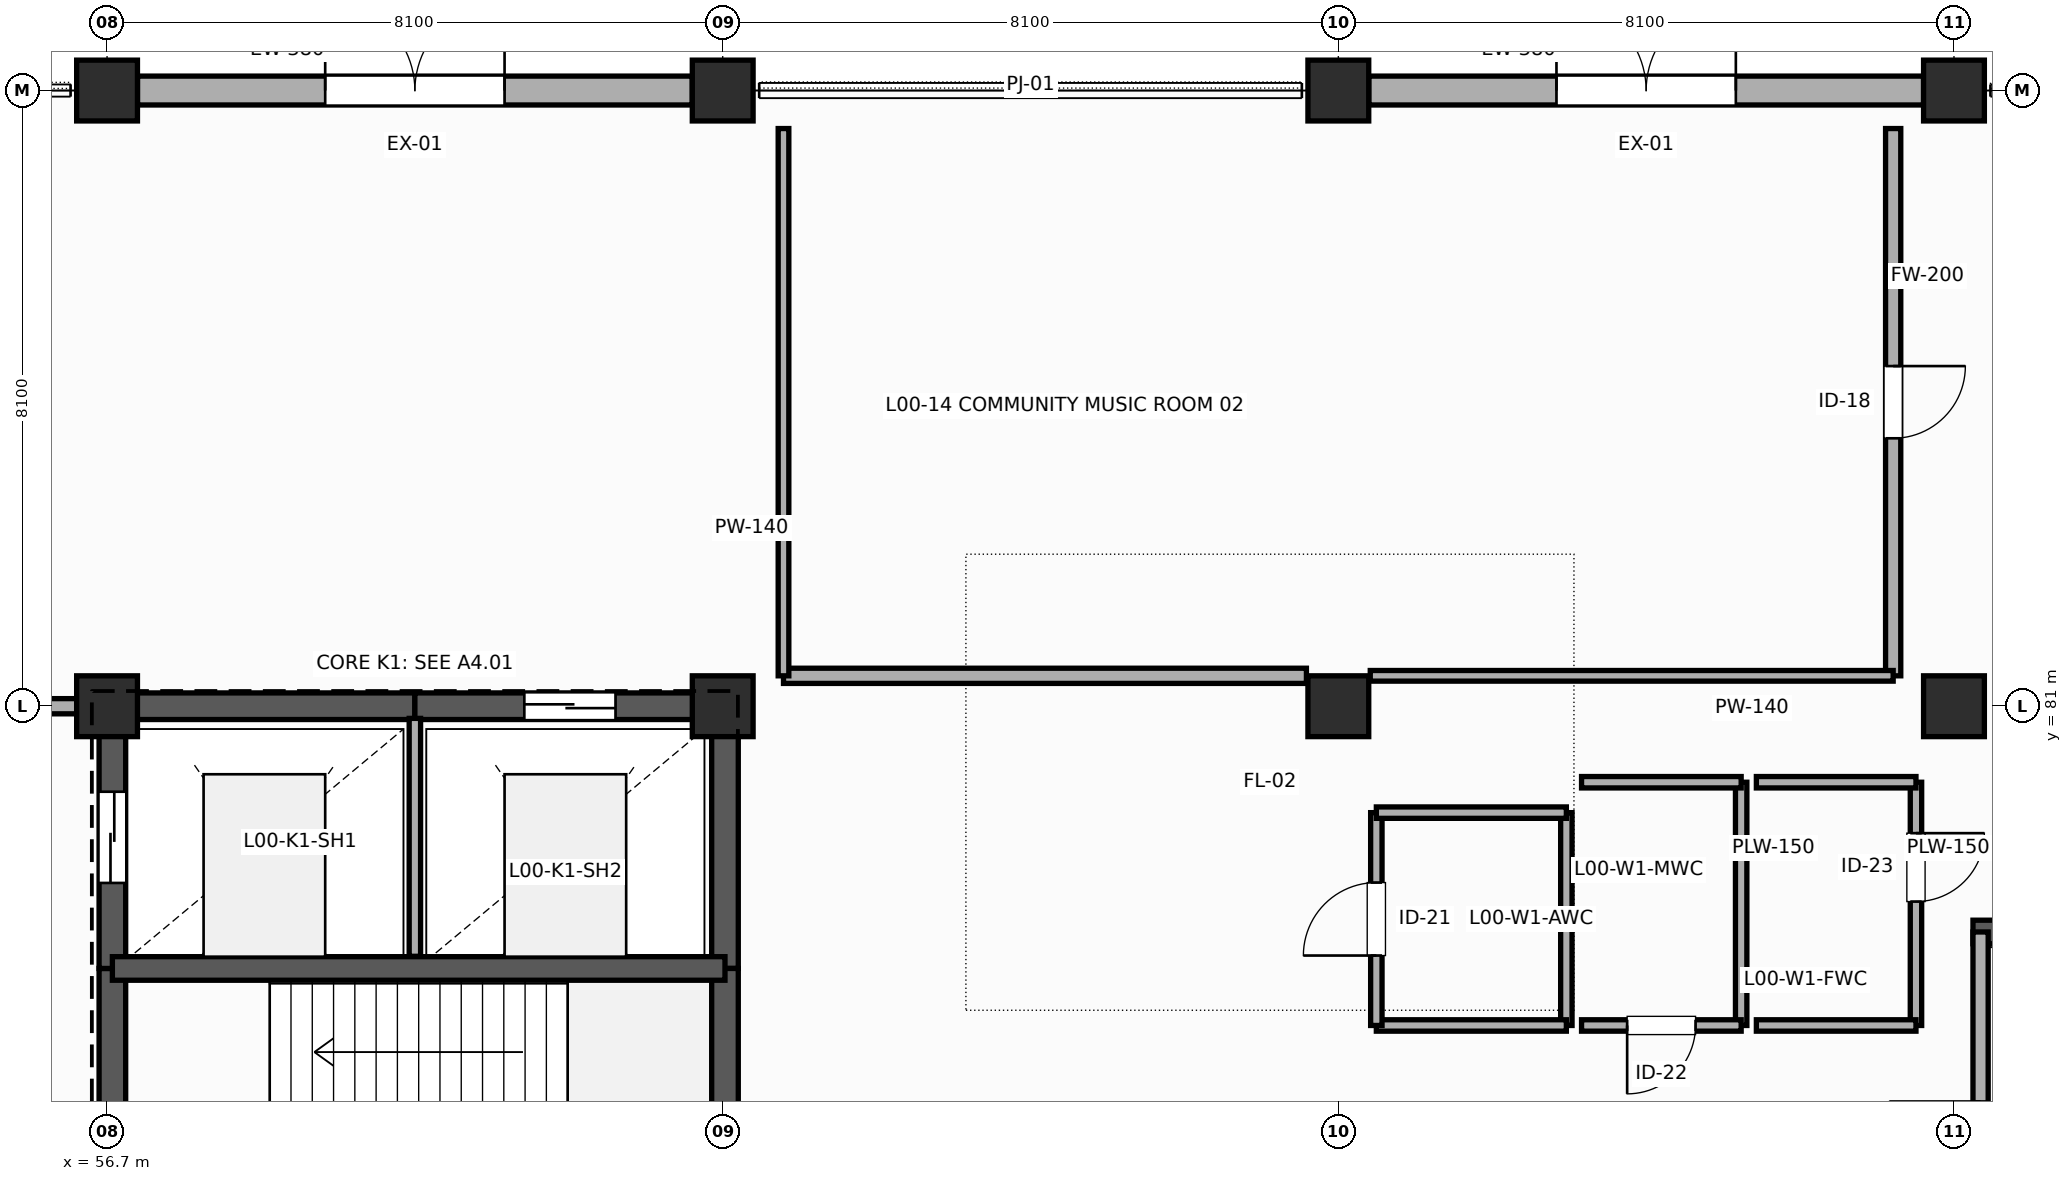
"""IFC4 building model, lengths in metres.
Left out: names, types, materials, properties, quantities, classifications, styles, units other than length and angle.
Written with IfcOpenShell. Run it as: python <this file> out.ifc"""

import sys

from ifc_helpers import new_model, si_unit, direction, frame, frame_2d, origin, origin_2d, place, context, subcontext, project, spatial, rectangle, extrude, element, fill, save


model = new_model("IFC4")
c1 = context("Model", 3, precision=1e-05, world=origin(), true_north=direction((0.0, 1.0)))
c2 = subcontext(c1, "Body", "Model", "MODEL_VIEW")
j1 = project(units=[si_unit("LENGTHUNIT", "METRE"), si_unit("PLANEANGLEUNIT", "RADIAN")], contexts=[c1])
p1 = place(None, origin())
s1 = spatial("IfcSite", under=j1, at=p1, CompositionType="ELEMENT")
p2 = place(p1, origin())
s2 = spatial("IfcBuilding", under=s1, at=p2, CompositionType="ELEMENT")
p3 = place(p2, origin())
s3 = spatial("IfcBuildingStorey", under=s2, at=p3, CompositionType="ELEMENT", Elevation=0.0)
for number, where, z_axis, x_axis in (
    (1, (56.7, 81.0, 0.0), (0.0, 0.0, 1.0), (1.0, 0.0, 0.0)),
    (2, (56.7, 89.1, 0.0), (0.0, 0.0, 1.0), (1.0, 0.0, 0.0)),
    (3, (64.8, 81.0, 0.0), (0.0, 0.0, 1.0), (1.0, 0.0, 0.0)),
    (4, (64.8, 89.1, 0.0), (0.0, 0.0, 1.0), (1.0, 0.0, 0.0)),
    (5, (72.9, 81.0, 0.0), (0.0, 0.0, 1.0), (1.0, 0.0, 0.0)),
    (6, (72.9, 89.1, 0.0), (0.0, 0.0, 1.0), (1.0, 0.0, 0.0)),
    (7, (81.0, 81.0, 0.0), (0.0, 0.0, 1.0), (1.0, 0.0, 0.0)),
    (8, (81.0, 89.1, 0.0), (0.0, 0.0, 1.0), (1.0, 0.0, 0.0)),
):
    element("IfcColumn", number, at=place(p3, frame(where, z_axis=z_axis, x_axis=x_axis)), inside=s3, PredefinedType="COLUMN", context=c2, shape_type="SweptSolid", body=[
        extrude(rectangle(XDim=0.8, YDim=0.8, at=origin_2d()), origin(), (0.0, 0.0, 1.0), 5.4),
    ])
p4 = place(p3, frame((57.1, 89.1, 0.0), z_axis=(0.0, 0.0, 1.0), x_axis=(1.0, 0.0, 0.0)))
e9 = element("IfcWall", 9, at=p4, inside=s3, PredefinedType="SOLIDWALL", context=c2, shape_type="SweptSolid", body=[
    extrude(rectangle(XDim=7.3, YDim=0.38, at=frame_2d((3.65, 0.0))), origin(), (0.0, 0.0, 1.0), 4.675),
])
p5 = place(p4, frame((2.47, 0.0, 0.0)))
e10 = element("IfcOpeningElement", 10, at=p5, cuts=e9, PredefinedType="OPENING", context=c2, shape_type="SweptSolid", body=[
    extrude(rectangle(XDim=2.36, YDim=2.4, at=frame_2d((1.18, 1.2))), frame((0.0, 0.2, 0.0), z_axis=(0.0, -1.0, 0.0), x_axis=(1.0, 0.0, 0.0)), (0.0, 0.0, 1.0), 0.4),
])
p6 = place(p3, frame((73.3, 89.1, 0.0), z_axis=(0.0, 0.0, 1.0), x_axis=(1.0, 0.0, 0.0)))
e11 = element("IfcWall", 11, at=p6, inside=s3, PredefinedType="SOLIDWALL", context=c2, shape_type="SweptSolid", body=[
    extrude(rectangle(XDim=7.3, YDim=0.38, at=frame_2d((3.65, 0.0))), origin(), (0.0, 0.0, 1.0), 4.675),
])
p7 = place(p6, frame((2.47, 0.0, 0.0)))
e12 = element("IfcOpeningElement", 12, at=p7, cuts=e11, PredefinedType="OPENING", context=c2, shape_type="SweptSolid", body=[
    extrude(rectangle(XDim=2.36, YDim=2.4, at=frame_2d((1.18, 1.2))), frame((0.0, 0.2, 0.0), z_axis=(0.0, -1.0, 0.0), x_axis=(1.0, 0.0, 0.0)), (0.0, 0.0, 1.0), 0.4),
])
p8 = place(p3, frame((56.77, 73.13, 0.0), z_axis=(0.0, 0.0, 1.0), x_axis=(0.0, 1.0, 0.0)))
e13 = element("IfcWall", 13, at=p8, inside=s3, PredefinedType="SHEAR", context=c2, shape_type="SweptSolid", body=[
    extrude(rectangle(XDim=4.42, YDim=0.35, at=frame_2d((2.21, 0.0))), origin(), (0.0, 0.0, 1.0), 5.4),
])
p9 = place(p8, frame((1.35, 0.0, 0.0)))
e14 = element("IfcOpeningElement", 14, at=p9, cuts=e13, PredefinedType="OPENING", context=c2, shape_type="SweptSolid", body=[
    extrude(rectangle(XDim=1.2, YDim=2.25, at=frame_2d((0.6, 1.125))), frame((0.0, 0.185, 0.0), z_axis=(0.0, -1.0, 0.0), x_axis=(1.0, 0.0, 0.0)), (0.0, 0.0, 1.0), 0.37),
])
p10 = place(p3, frame((56.77, 77.55, 0.0), z_axis=(0.0, 0.0, 1.0), x_axis=(0.0, 1.0, 0.0)))
e15 = element("IfcWall", 15, at=p10, inside=s3, PredefinedType="SHEAR", context=c2, shape_type="SweptSolid", body=[
    extrude(rectangle(XDim=3.45, YDim=0.35, at=frame_2d((1.725, 0.0))), origin(), (0.0, 0.0, 1.0), 5.4),
])
p11 = place(p10, frame((1.125, 0.0, 0.0)))
e16 = element("IfcOpeningElement", 16, at=p11, cuts=e15, PredefinedType="OPENING", context=c2, shape_type="SweptSolid", body=[
    extrude(rectangle(XDim=1.2, YDim=2.2, at=frame_2d((0.6, 1.1))), frame((0.0, 0.185, 0.0), z_axis=(0.0, -1.0, 0.0), x_axis=(1.0, 0.0, 0.0)), (0.0, 0.0, 1.0), 0.37),
])
p12 = place(p3, frame((56.77, 81.0, 0.0), z_axis=(0.0, 0.0, 1.0), x_axis=(1.0, 0.0, 0.0)))
e17 = element("IfcWall", 17, at=p12, inside=s3, PredefinedType="SHEAR", context=c2, shape_type="SweptSolid", body=[
    extrude(rectangle(XDim=3.98, YDim=0.35, at=frame_2d((1.99, 0.0))), origin(), (0.0, 0.0, 1.0), 5.4),
])
p13 = place(p3, frame((60.75, 81.0, 0.0), z_axis=(0.0, 0.0, 1.0), x_axis=(1.0, 0.0, 0.0)))
e18 = element("IfcWall", 18, at=p13, inside=s3, PredefinedType="SHEAR", context=c2, shape_type="SweptSolid", body=[
    extrude(rectangle(XDim=4.08, YDim=0.35, at=frame_2d((2.04, 0.0))), origin(), (0.0, 0.0, 1.0), 5.4),
])
p14 = place(p13, frame((1.44, 0.0, 0.0)))
e19 = element("IfcOpeningElement", 19, at=p14, cuts=e18, PredefinedType="OPENING", context=c2, shape_type="SweptSolid", body=[
    extrude(rectangle(XDim=1.2, YDim=2.2, at=frame_2d((0.6, 1.1))), frame((0.0, 0.185, 0.0), z_axis=(0.0, -1.0, 0.0), x_axis=(1.0, 0.0, 0.0)), (0.0, 0.0, 1.0), 0.37),
])
p15 = place(p3, frame((64.83, 81.0, 0.0), z_axis=(0.0, 0.0, 1.0), x_axis=(0.0, -1.0, 0.0)))
e20 = element("IfcWall", 20, at=p15, inside=s3, PredefinedType="SHEAR", context=c2, shape_type="SweptSolid", body=[
    extrude(rectangle(XDim=3.45, YDim=0.35, at=frame_2d((1.725, 0.0))), origin(), (0.0, 0.0, 1.0), 5.4),
])
p16 = place(p3, frame((64.83, 77.55, 0.0), z_axis=(0.0, 0.0, 1.0), x_axis=(0.0, -1.0, 0.0)))
e21 = element("IfcWall", 21, at=p16, inside=s3, PredefinedType="SHEAR", context=c2, shape_type="SweptSolid", body=[
    extrude(rectangle(XDim=4.42, YDim=0.35, at=frame_2d((2.21, 0.0))), origin(), (0.0, 0.0, 1.0), 5.4),
])
p17 = place(p3, frame((56.77, 77.55, 0.0), z_axis=(0.0, 0.0, 1.0), x_axis=(1.0, 0.0, 0.0)))
e22 = element("IfcWall", 22, at=p17, inside=s3, PredefinedType="SHEAR", context=c2, shape_type="SweptSolid", body=[
    extrude(rectangle(XDim=8.06, YDim=0.31, at=frame_2d((4.03, 0.0))), origin(), (0.0, 0.0, 1.0), 5.4),
])
p18 = place(p3, frame((60.75, 77.71, 0.0), z_axis=(0.0, 0.0, 1.0), x_axis=(0.0, 1.0, 0.0)))
e23 = element("IfcWall", 23, at=p18, inside=s3, PredefinedType="PLUMBINGWALL", context=c2, shape_type="SweptSolid", body=[
    extrude(rectangle(XDim=3.13, YDim=0.15, at=frame_2d((1.565, 0.0))), origin(), (0.0, 0.0, 1.0), 5.05),
])
p19 = place(p3, frame((51.3, 81.0, 0.0), z_axis=(0.0, 0.0, 1.0), x_axis=(1.0, 0.0, 0.0)))
e24 = element("IfcWall", 24, at=p19, inside=s3, PredefinedType="PARTITIONING", context=c2, shape_type="SweptSolid", body=[
    extrude(rectangle(XDim=5.0, YDim=0.2, at=frame_2d((2.5, 0.0))), origin(), (0.0, 0.0, 1.0), 4.611),
])
p20 = place(p3, frame((89.795, 78.03, 0.0), z_axis=(0.0, 0.0, 1.0), x_axis=(-1.0, 0.0, 0.0)))
e25 = element("IfcWall", 25, at=p20, inside=s3, PredefinedType="SHEAR", context=c2, shape_type="SweptSolid", body=[
    extrude(rectangle(XDim=8.545, YDim=0.31, at=frame_2d((4.272, 0.0))), origin(), (0.0, 0.0, 1.0), 5.4),
])
p21 = place(p3, frame((81.35, 73.35, 0.0), z_axis=(0.0, 0.0, 1.0), x_axis=(0.0, 1.0, 0.0)))
e26 = element("IfcWall", 26, at=p21, inside=s3, PredefinedType="PARTITIONING", context=c2, shape_type="SweptSolid", body=[
    extrude(rectangle(XDim=4.68, YDim=0.2, at=frame_2d((2.34, 0.0))), origin(), (0.0, 0.0, 1.0), 5.05),
])
p22 = place(p21, frame((1.25, 0.0, 0.0)))
e27 = element("IfcOpeningElement", 27, at=p22, cuts=e26, PredefinedType="OPENING", context=c2, shape_type="SweptSolid", body=[
    extrude(rectangle(XDim=1.2, YDim=2.25, at=frame_2d((0.6, 1.125))), frame((0.0, 0.11, 0.0), z_axis=(0.0, -1.0, 0.0), x_axis=(1.0, 0.0, 0.0)), (0.0, 0.0, 1.0), 0.22),
])
p23 = place(p3, frame((75.9, 79.6, 0.0), z_axis=(0.0, 0.0, 1.0), x_axis=(0.0, -1.0, 0.0)))
e28 = element("IfcWall", 28, at=p23, inside=s3, PredefinedType="PLUMBINGWALL", context=c2, shape_type="SweptSolid", body=[
    extrude(rectangle(XDim=2.8, YDim=0.15, at=frame_2d((1.4, 0.0))), origin(), (0.0, 0.0, 1.0), 5.12),
])
p24 = place(p3, frame((75.9, 76.8, 0.0), z_axis=(0.0, 0.0, 1.0), x_axis=(-1.0, 0.0, 0.0)))
e29 = element("IfcWall", 29, at=p24, inside=s3, PredefinedType="PLUMBINGWALL", context=c2, shape_type="SweptSolid", body=[
    extrude(rectangle(XDim=2.5, YDim=0.15, at=frame_2d((1.25, 0.0))), origin(), (0.0, 0.0, 1.0), 5.12),
])
p25 = place(p3, frame((73.4, 76.8, 0.0), z_axis=(0.0, 0.0, 1.0), x_axis=(0.0, 1.0, 0.0)))
e30 = element("IfcWall", 30, at=p25, inside=s3, PredefinedType="PLUMBINGWALL", context=c2, shape_type="SweptSolid", body=[
    extrude(rectangle(XDim=2.8, YDim=0.15, at=frame_2d((1.4, 0.0))), origin(), (0.0, 0.0, 1.0), 5.12),
])
p26 = place(p25, frame((0.92, 0.0, 0.0)))
e31 = element("IfcOpeningElement", 31, at=p26, cuts=e30, PredefinedType="OPENING", context=c2, shape_type="SweptSolid", body=[
    extrude(rectangle(XDim=0.96, YDim=2.16, at=frame_2d((0.48, 1.08))), frame((0.0, 0.085, 0.0), z_axis=(0.0, -1.0, 0.0), x_axis=(1.0, 0.0, 0.0)), (0.0, 0.0, 1.0), 0.17),
])
p27 = place(p3, frame((73.4, 79.6, 0.0), z_axis=(0.0, 0.0, 1.0), x_axis=(1.0, 0.0, 0.0)))
e32 = element("IfcWall", 32, at=p27, inside=s3, PredefinedType="PLUMBINGWALL", context=c2, shape_type="SweptSolid", body=[
    extrude(rectangle(XDim=2.5, YDim=0.15, at=frame_2d((1.25, 0.0))), origin(), (0.0, 0.0, 1.0), 5.12),
])
p28 = place(p3, frame((78.2, 80.0, 0.0), z_axis=(0.0, 0.0, 1.0), x_axis=(0.0, -1.0, 0.0)))
e33 = element("IfcWall", 33, at=p28, inside=s3, PredefinedType="PLUMBINGWALL", context=c2, shape_type="SweptSolid", body=[
    extrude(rectangle(XDim=3.2, YDim=0.15, at=frame_2d((1.6, 0.0))), origin(), (0.0, 0.0, 1.0), 5.12),
])
p29 = place(p3, frame((78.2, 76.8, 0.0), z_axis=(0.0, 0.0, 1.0), x_axis=(-1.0, 0.0, 0.0)))
e34 = element("IfcWall", 34, at=p29, inside=s3, PredefinedType="PLUMBINGWALL", context=c2, shape_type="SweptSolid", body=[
    extrude(rectangle(XDim=2.1, YDim=0.15, at=frame_2d((1.05, 0.0))), origin(), (0.0, 0.0, 1.0), 5.12),
])
p30 = place(p29, frame((0.6, 0.0, 0.0)))
e35 = element("IfcOpeningElement", 35, at=p30, cuts=e34, PredefinedType="OPENING", context=c2, shape_type="SweptSolid", body=[
    extrude(rectangle(XDim=0.9, YDim=2.1, at=frame_2d((0.45, 1.05))), frame((0.0, 0.085, 0.0), z_axis=(0.0, -1.0, 0.0), x_axis=(1.0, 0.0, 0.0)), (0.0, 0.0, 1.0), 0.17),
])
p31 = place(p3, frame((76.1, 80.0, 0.0), z_axis=(0.0, 0.0, 1.0), x_axis=(1.0, 0.0, 0.0)))
e36 = element("IfcWall", 36, at=p31, inside=s3, PredefinedType="PLUMBINGWALL", context=c2, shape_type="SweptSolid", body=[
    extrude(rectangle(XDim=2.1, YDim=0.15, at=frame_2d((1.05, 0.0))), origin(), (0.0, 0.0, 1.0), 5.12),
])
p32 = place(p3, frame((80.5, 80.0, 0.0), z_axis=(0.0, 0.0, 1.0), x_axis=(0.0, -1.0, 0.0)))
e37 = element("IfcWall", 37, at=p32, inside=s3, PredefinedType="PLUMBINGWALL", context=c2, shape_type="SweptSolid", body=[
    extrude(rectangle(XDim=3.2, YDim=0.15, at=frame_2d((1.6, 0.0))), origin(), (0.0, 0.0, 1.0), 5.12),
])
p33 = place(p32, frame((0.67, 0.0, 0.0)))
e38 = element("IfcOpeningElement", 38, at=p33, cuts=e37, PredefinedType="OPENING", context=c2, shape_type="SweptSolid", body=[
    extrude(rectangle(XDim=0.9, YDim=2.2, at=frame_2d((0.45, 1.1))), frame((0.0, 0.085, 0.0), z_axis=(0.0, -1.0, 0.0), x_axis=(1.0, 0.0, 0.0)), (0.0, 0.0, 1.0), 0.17),
])
for number, where, z_axis, x_axis in (
    (39, (80.5, 76.8, 0.0), (0.0, 0.0, 1.0), (-1.0, 0.0, 0.0)),
    (40, (78.4, 80.0, 0.0), (0.0, 0.0, 1.0), (1.0, 0.0, 0.0)),
):
    element("IfcWall", number, at=place(p3, frame(where, z_axis=z_axis, x_axis=x_axis)), inside=s3, PredefinedType="PLUMBINGWALL", context=c2, shape_type="SweptSolid", body=[
        extrude(rectangle(XDim=2.1, YDim=0.15, at=frame_2d((1.05, 0.0))), origin(), (0.0, 0.0, 1.0), 5.12),
    ])
p34 = place(p3, frame((80.2, 88.6, 0.0), z_axis=(0.0, 0.0, 1.0), x_axis=(0.0, -1.0, 0.0)))
e41 = element("IfcWall", 41, at=p34, inside=s3, PredefinedType="PARTITIONING", context=c2, shape_type="SweptSolid", body=[
    extrude(rectangle(XDim=7.2, YDim=0.2, at=frame_2d((3.6, 0.0))), origin(), (0.0, 0.0, 1.0), 5.12),
])
p35 = place(p34, frame((3.125, 0.0, 0.0)))
e42 = element("IfcOpeningElement", 42, at=p35, cuts=e41, PredefinedType="OPENING", context=c2, shape_type="SweptSolid", body=[
    extrude(rectangle(XDim=0.95, YDim=2.15, at=frame_2d((0.475, 1.075))), frame((0.0, 0.11, 0.0), z_axis=(0.0, -1.0, 0.0), x_axis=(1.0, 0.0, 0.0)), (0.0, 0.0, 1.0), 0.22),
])
p36 = place(p3, frame((80.2, 81.4, 0.0), z_axis=(0.0, 0.0, 1.0), x_axis=(-1.0, 0.0, 0.0)))
e43 = element("IfcWall", 43, at=p36, inside=s3, PredefinedType="PARTITIONING", context=c2, shape_type="SweptSolid", body=[
    extrude(rectangle(XDim=6.88, YDim=0.14, at=frame_2d((3.44, 0.0))), origin(), (0.0, 0.0, 1.0), 4.244),
])
p37 = place(p3, frame((72.48, 81.4, 0.0), z_axis=(0.0, 0.0, 1.0), x_axis=(-1.0, 0.0, 0.0)))
e44 = element("IfcWall", 44, at=p37, inside=s3, PredefinedType="PARTITIONING", context=c2, shape_type="SweptSolid", body=[
    extrude(rectangle(XDim=6.88, YDim=0.2, at=frame_2d((3.44, 0.0))), origin(), (0.0, 0.0, 1.0), 4.344),
])
p38 = place(p3, frame((65.6, 81.4, 0.0), z_axis=(0.0, 0.0, 1.0), x_axis=(0.0, 1.0, 0.0)))
e45 = element("IfcWall", 45, at=p38, inside=s3, PredefinedType="PARTITIONING", context=c2, shape_type="SweptSolid", body=[
    extrude(rectangle(XDim=7.2, YDim=0.14, at=frame_2d((3.6, 0.0))), origin(), (0.0, 0.0, 1.0), 5.12),
])
p39 = place(p5, origin())
e46 = element("IfcDoor", 46, at=p39, inside=s3, OperationType="DOUBLE_DOOR_SINGLE_SWING", PredefinedType="DOOR", context=c2, shape_type="SweptSolid", body=[
    extrude(rectangle(XDim=2.36, YDim=2.4, at=frame_2d((1.18, 1.2))), frame((0.0, 0.025, 0.0), z_axis=(0.0, -1.0, 0.0), x_axis=(1.0, 0.0, 0.0)), (0.0, 0.0, 1.0), 0.05),
])
fill(e10, e46)
p40 = place(p7, origin())
e47 = element("IfcDoor", 47, at=p40, inside=s3, OperationType="DOUBLE_DOOR_SINGLE_SWING", PredefinedType="DOOR", context=c2, shape_type="SweptSolid", body=[
    extrude(rectangle(XDim=2.36, YDim=2.4, at=frame_2d((1.18, 1.2))), frame((0.0, 0.025, 0.0), z_axis=(0.0, -1.0, 0.0), x_axis=(1.0, 0.0, 0.0)), (0.0, 0.0, 1.0), 0.05),
])
fill(e12, e47)
p41 = place(p11, origin())
e48 = element("IfcDoor", 48, at=p41, inside=s3, OperationType="SLIDING_TO_LEFT", PredefinedType="DOOR", context=c2, shape_type="SweptSolid", body=[
    extrude(rectangle(XDim=1.2, YDim=2.2, at=frame_2d((0.6, 1.1))), frame((0.0, 0.025, 0.0), z_axis=(0.0, -1.0, 0.0), x_axis=(1.0, 0.0, 0.0)), (0.0, 0.0, 1.0), 0.05),
])
fill(e16, e48)
p42 = place(p14, origin())
e49 = element("IfcDoor", 49, at=p42, inside=s3, OperationType="SLIDING_TO_LEFT", PredefinedType="DOOR", context=c2, shape_type="SweptSolid", body=[
    extrude(rectangle(XDim=1.2, YDim=2.2, at=frame_2d((0.6, 1.1))), frame((0.0, 0.025, 0.0), z_axis=(0.0, -1.0, 0.0), x_axis=(1.0, 0.0, 0.0)), (0.0, 0.0, 1.0), 0.05),
])
fill(e19, e49)
p43 = place(p22, origin())
e50 = element("IfcDoor", 50, at=p43, inside=s3, OperationType="SINGLE_SWING_RIGHT", PredefinedType="DOOR", context=c2, shape_type="SweptSolid", body=[
    extrude(rectangle(XDim=1.2, YDim=2.25, at=frame_2d((0.6, 1.125))), frame((0.0, 0.025, 0.0), z_axis=(0.0, -1.0, 0.0), x_axis=(1.0, 0.0, 0.0)), (0.0, 0.0, 1.0), 0.05),
])
fill(e27, e50)
p44 = place(p26, origin())
e51 = element("IfcDoor", 51, at=p44, inside=s3, OperationType="SINGLE_SWING_LEFT", PredefinedType="DOOR", context=c2, shape_type="SweptSolid", body=[
    extrude(rectangle(XDim=0.96, YDim=2.16, at=frame_2d((0.48, 1.08))), frame((0.0, 0.025, 0.0), z_axis=(0.0, -1.0, 0.0), x_axis=(1.0, 0.0, 0.0)), (0.0, 0.0, 1.0), 0.05),
])
fill(e31, e51)
p45 = place(p30, origin())
e52 = element("IfcDoor", 52, at=p45, inside=s3, OperationType="SINGLE_SWING_RIGHT", PredefinedType="DOOR", context=c2, shape_type="SweptSolid", body=[
    extrude(rectangle(XDim=0.9, YDim=2.1, at=frame_2d((0.45, 1.05))), frame((0.0, 0.025, 0.0), z_axis=(0.0, -1.0, 0.0), x_axis=(1.0, 0.0, 0.0)), (0.0, 0.0, 1.0), 0.05),
])
fill(e35, e52)
p46 = place(p33, origin())
e53 = element("IfcDoor", 53, at=p46, inside=s3, OperationType="SINGLE_SWING_LEFT", PredefinedType="DOOR", context=c2, shape_type="SweptSolid", body=[
    extrude(rectangle(XDim=0.9, YDim=2.2, at=frame_2d((0.45, 1.1))), frame((0.0, 0.025, 0.0), z_axis=(0.0, -1.0, 0.0), x_axis=(1.0, 0.0, 0.0)), (0.0, 0.0, 1.0), 0.05),
])
fill(e38, e53)
p47 = place(p35, origin())
e54 = element("IfcDoor", 54, at=p47, inside=s3, OperationType="SINGLE_SWING_LEFT", PredefinedType="DOOR", context=c2, shape_type="SweptSolid", body=[
    extrude(rectangle(XDim=0.95, YDim=2.15, at=frame_2d((0.475, 1.075))), frame((0.0, 0.025, 0.0), z_axis=(0.0, -1.0, 0.0), x_axis=(1.0, 0.0, 0.0)), (0.0, 0.0, 1.0), 0.05),
])
fill(e42, e54)
save(model, sys.argv[1])
